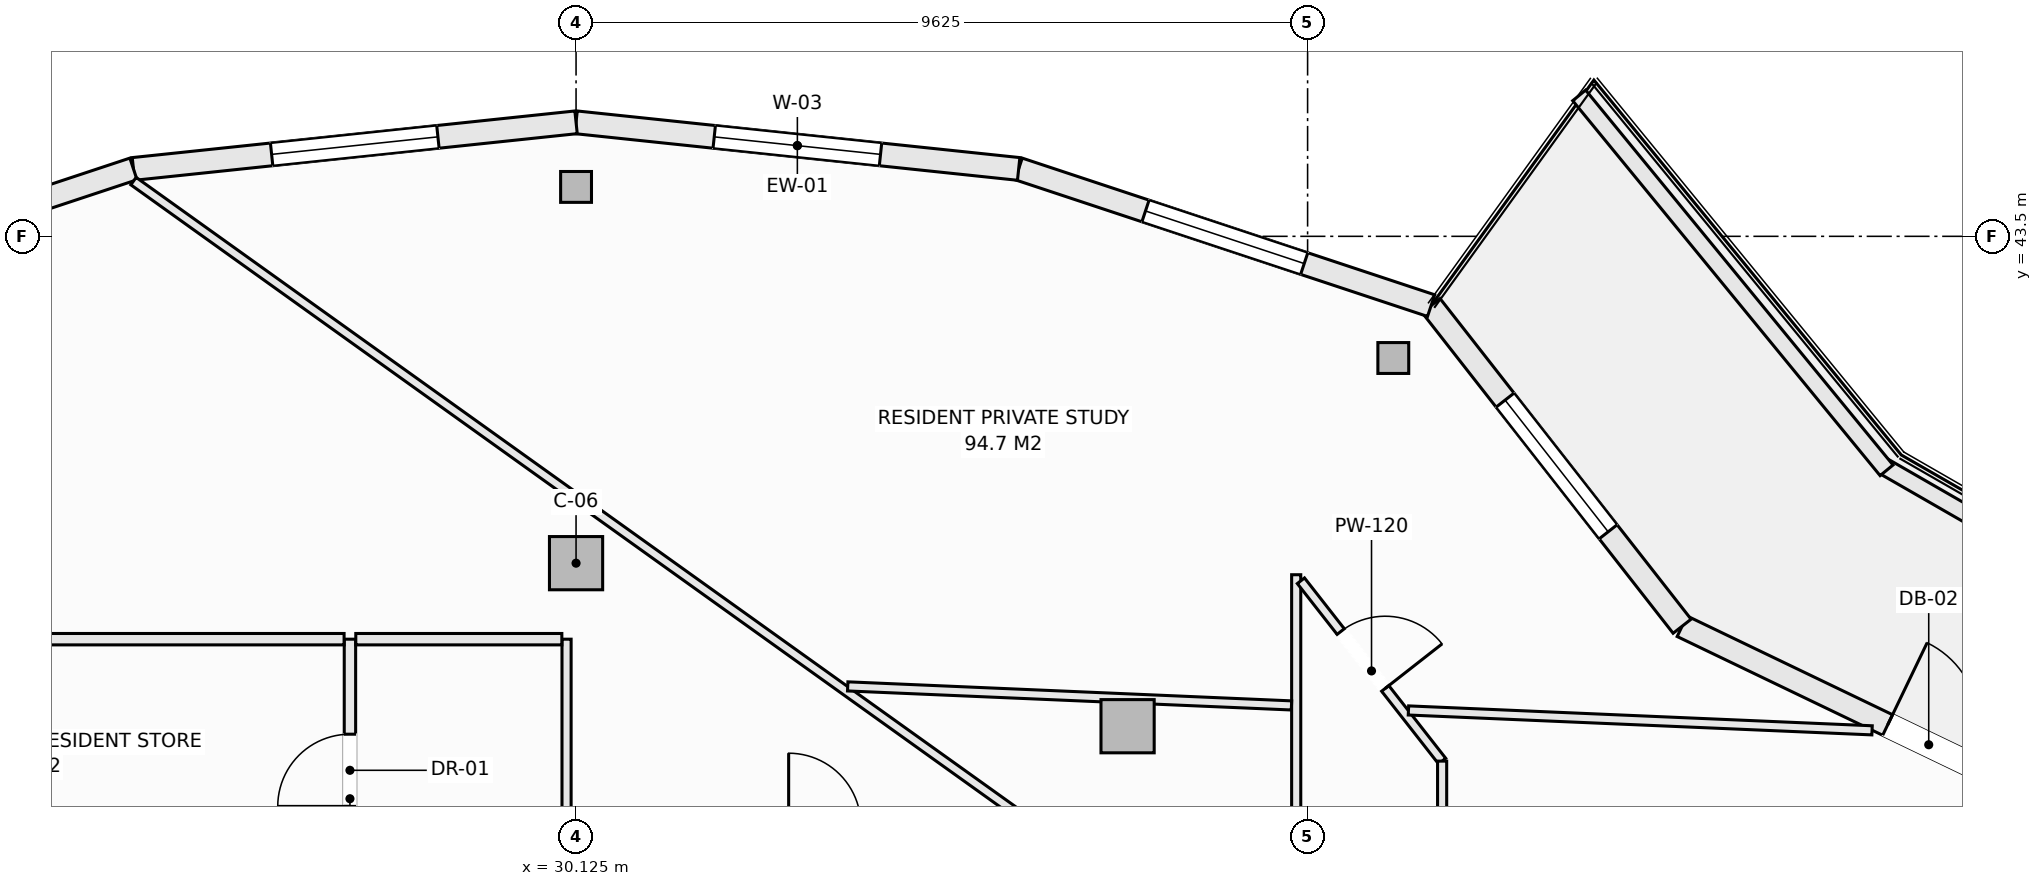
"""IFC4 building model, lengths in metres.
Left out: names, types, materials, properties, quantities, classifications, styles, units other than length and angle.
Written with IfcOpenShell. Run it as: python <this file> out.ifc"""

import sys

from ifc_helpers import new_model, si_unit, direction, frame, frame_2d, origin, origin_2d, place, context, subcontext, project, spatial, rectangle, hollow_rectangle, extrude, element, fill, save


model = new_model("IFC4")
c1 = context("Model", 3, precision=1e-05, world=origin(), true_north=direction((0.0, 1.0)))
c2 = subcontext(c1, "Body", "Model", "MODEL_VIEW")
j1 = project(units=[si_unit("LENGTHUNIT", "METRE"), si_unit("PLANEANGLEUNIT", "RADIAN")], contexts=[c1])
p1 = place(None, origin())
s1 = spatial("IfcSite", under=j1, at=p1, CompositionType="ELEMENT")
p2 = place(p1, origin())
s2 = spatial("IfcBuilding", under=s1, at=p2, CompositionType="ELEMENT")
p3 = place(p2, frame((0.0, 0.0, 252.5)))
s3 = spatial("IfcBuildingStorey", under=s2, at=p3, CompositionType="ELEMENT", Elevation=252.5)
for number, where, z_axis, x_axis in (
    (1, (40.878, 41.899, -0.27), (0.0, 0.0, 1.0), (1.0, 0.0, 0.0)),
    (2, (30.125, 44.15, -0.27), (0.0, 0.0, 1.0), (1.0, 0.0, 0.0)),
):
    element("IfcColumn", number, at=place(p3, frame(where, z_axis=z_axis, x_axis=x_axis)), inside=s3, PredefinedType="COLUMN", context=c2, shape_type="SweptSolid", body=[
        extrude(hollow_rectangle(XDim=0.406, YDim=0.406, WallThickness=0.016, at=origin_2d()), origin(), (0.0, 0.0, 1.0), 3.3),
    ])
for number, where, z_axis, x_axis in (
    (3, (37.382, 37.055, -0.27), (0.0, 0.0, 1.0), (1.0, 0.0, 0.0)),
    (4, (30.125, 39.2, -0.27), (0.0, 0.0, 1.0), (1.0, 0.0, 0.0)),
):
    element("IfcColumn", number, at=place(p3, frame(where, z_axis=z_axis, x_axis=x_axis)), inside=s3, PredefinedType="COLUMN", context=c2, shape_type="SweptSolid", body=[
        extrude(rectangle(XDim=0.7, YDim=0.7, at=origin_2d()), origin(), (0.0, 0.0, 1.0), 3.3),
    ])
p4 = place(p3, frame((44.677, 38.37, 0.0), z_axis=(0.0, 0.0, 1.0), x_axis=(0.901355238351, -0.433080517106, 0.0)))
e5 = element("IfcWall", 5, at=p4, inside=s3, PredefinedType="SOLIDWALL", context=c2, shape_type="SweptSolid", body=[
    extrude(rectangle(XDim=5.473, YDim=0.3, at=frame_2d((2.737, 0.0))), origin(), (0.0, 0.0, 1.0), 2.605),
])
p5 = place(p4, frame((3.0, 0.0, 0.0)))
e6 = element("IfcOpeningElement", 6, at=p5, cuts=e5, PredefinedType="OPENING", context=c2, shape_type="SweptSolid", body=[
    extrude(rectangle(XDim=1.2, YDim=2.2, at=frame_2d((0.6, 1.1))), frame((0.0, 0.16, 0.0), z_axis=(0.0, -1.0, 0.0), x_axis=(1.0, 0.0, 0.0)), (0.0, 0.0, 1.0), 0.32),
])
p6 = place(p3, frame((41.375, 42.588, 0.0), z_axis=(0.0, 0.0, 1.0), x_axis=(0.61644588519, -0.787397276241, 0.0)))
e7 = element("IfcWall", 7, at=p6, inside=s3, PredefinedType="SOLIDWALL", context=c2, shape_type="SweptSolid", body=[
    extrude(rectangle(XDim=5.357, YDim=0.3, at=frame_2d((2.678, 0.0))), origin(), (0.0, 0.0, 1.0), 2.605),
])
p7 = place(p6, frame((1.579, 0.0, 0.72)))
e8 = element("IfcOpeningElement", 8, at=p7, cuts=e7, PredefinedType="OPENING", context=c2, shape_type="SweptSolid", body=[
    extrude(rectangle(XDim=2.2, YDim=1.65, at=frame_2d((1.1, 0.825))), frame((0.0, 0.16, 0.0), z_axis=(0.0, -1.0, 0.0), x_axis=(1.0, 0.0, 0.0)), (0.0, 0.0, 1.0), 0.32),
])
p8 = place(p3, frame((35.948, 44.387, 0.0), z_axis=(0.0, 0.0, 1.0), x_axis=(0.949232769585, -0.314574552605, 0.0)))
e9 = element("IfcWall", 9, at=p8, inside=s3, PredefinedType="SOLIDWALL", context=c2, shape_type="SweptSolid", body=[
    extrude(rectangle(XDim=5.717, YDim=0.3, at=frame_2d((2.858, 0.0))), origin(), (0.0, 0.0, 1.0), 2.605),
])
p9 = place(p8, frame((1.758, 0.0, 0.72)))
e10 = element("IfcOpeningElement", 10, at=p9, cuts=e9, PredefinedType="OPENING", context=c2, shape_type="SweptSolid", body=[
    extrude(rectangle(XDim=2.2, YDim=1.65, at=frame_2d((1.1, 0.825))), frame((0.0, 0.16, 0.0), z_axis=(0.0, -1.0, 0.0), x_axis=(1.0, 0.0, 0.0)), (0.0, 0.0, 1.0), 0.32),
])
p10 = place(p3, frame((30.125, 45.0, 0.0), z_axis=(0.0, 0.0, 1.0), x_axis=(0.994500425783, -0.10473253132, 0.0)))
e11 = element("IfcWall", 11, at=p10, inside=s3, PredefinedType="SOLIDWALL", context=c2, shape_type="SweptSolid", body=[
    extrude(rectangle(XDim=5.856, YDim=0.3, at=frame_2d((2.928, 0.0))), origin(), (0.0, 0.0, 1.0), 2.605),
])
p11 = place(p10, frame((1.828, 0.0, 0.72)))
e12 = element("IfcOpeningElement", 12, at=p11, cuts=e11, PredefinedType="OPENING", context=c2, shape_type="SweptSolid", body=[
    extrude(rectangle(XDim=2.2, YDim=1.65, at=frame_2d((1.1, 0.825))), frame((0.0, 0.16, 0.0), z_axis=(0.0, -1.0, 0.0), x_axis=(1.0, 0.0, 0.0)), (0.0, 0.0, 1.0), 0.32),
])
p12 = place(p3, frame((24.302, 44.387, 0.0), z_axis=(0.0, 0.0, 1.0), x_axis=(0.994500425783, 0.10473253132, 0.0)))
e13 = element("IfcWall", 13, at=p12, inside=s3, PredefinedType="SOLIDWALL", context=c2, shape_type="SweptSolid", body=[
    extrude(rectangle(XDim=5.856, YDim=0.3, at=frame_2d((2.928, 0.0))), origin(), (0.0, 0.0, 1.0), 2.605),
])
p13 = place(p12, frame((1.828, 0.0, 0.72)))
e14 = element("IfcOpeningElement", 14, at=p13, cuts=e13, PredefinedType="OPENING", context=c2, shape_type="SweptSolid", body=[
    extrude(rectangle(XDim=2.2, YDim=1.65, at=frame_2d((1.1, 0.825))), frame((0.0, 0.16, 0.0), z_axis=(0.0, -1.0, 0.0), x_axis=(1.0, 0.0, 0.0)), (0.0, 0.0, 1.0), 0.32),
])
p14 = place(p3, frame((18.875, 42.588, 0.0), z_axis=(0.0, 0.0, 1.0), x_axis=(0.949232769585, 0.314574552605, 0.0)))
e15 = element("IfcWall", 15, at=p14, inside=s3, PredefinedType="SOLIDWALL", context=c2, shape_type="SweptSolid", body=[
    extrude(rectangle(XDim=5.717, YDim=0.3, at=frame_2d((2.858, 0.0))), origin(), (0.0, 0.0, 1.0), 2.605),
])
p15 = place(p14, frame((1.758, 0.0, 0.72)))
e16 = element("IfcOpeningElement", 16, at=p15, cuts=e15, PredefinedType="OPENING", context=c2, shape_type="SweptSolid", body=[
    extrude(rectangle(XDim=2.2, YDim=1.65, at=frame_2d((1.1, 0.825))), frame((0.0, 0.16, 0.0), z_axis=(0.0, -1.0, 0.0), x_axis=(1.0, 0.0, 0.0)), (0.0, 0.0, 1.0), 0.32),
])
p16 = place(p3, frame((47.321, 40.479, 0.0), z_axis=(0.0, 0.0, 1.0), x_axis=(0.866901621005, -0.49847926687, 0.0)))
e17 = element("IfcWall", 17, at=p16, inside=s3, PredefinedType="PARAPET", context=c2, shape_type="SweptSolid", body=[
    extrude(rectangle(XDim=6.197, YDim=0.22, at=frame_2d((3.098, 0.0))), origin(), (0.0, 0.0, 1.0), 0.52),
])
p17 = place(p3, frame((43.323, 45.354, 0.0), z_axis=(0.0, 0.0, 1.0), x_axis=(0.63407318032, -0.77327304492, 0.0)))
e18 = element("IfcWall", 18, at=p17, inside=s3, PredefinedType="PARAPET", context=c2, shape_type="SweptSolid", body=[
    extrude(rectangle(XDim=6.379, YDim=0.22, at=frame_2d((3.189, 0.0))), origin(), (0.0, 0.0, 1.0), 0.52),
])
p18 = place(p3, frame((27.15, 34.002, 0.0), z_axis=(0.0, 0.0, 1.0), x_axis=(0.0, 1.0, 0.0)))
e19 = element("IfcWall", 19, at=p18, inside=s3, PredefinedType="PARTITIONING", context=c2, shape_type="SweptSolid", body=[
    extrude(rectangle(XDim=4.198, YDim=0.15, at=frame_2d((2.099, 0.0))), origin(), (0.0, 0.0, 1.0), 3.03),
])
p19 = place(p18, frame((1.998, 0.0, 0.0)))
e20 = element("IfcOpeningElement", 20, at=p19, cuts=e19, PredefinedType="OPENING", context=c2, shape_type="SweptSolid", body=[
    extrude(rectangle(XDim=0.95, YDim=2.1, at=frame_2d((0.475, 1.05))), frame((0.0, 0.085, 0.0), z_axis=(0.0, -1.0, 0.0), x_axis=(1.0, 0.0, 0.0)), (0.0, 0.0, 1.0), 0.17),
])
p20 = place(p3, frame((30.0, 35.75, 0.0), z_axis=(0.0, 0.0, 1.0), x_axis=(0.0, 1.0, 0.0)))
e21 = element("IfcWall", 21, at=p20, inside=s3, PredefinedType="PARTITIONING", context=c2, shape_type="SweptSolid", body=[
    extrude(rectangle(XDim=2.45, YDim=0.12, at=frame_2d((1.225, 0.0))), origin(), (0.0, 0.0, 1.0), 3.03),
])
p21 = place(p3, frame((18.577, 38.2, 0.0), z_axis=(0.0, 0.0, 1.0), x_axis=(1.0, 0.0, 0.0)))
e22 = element("IfcWall", 22, at=p21, inside=s3, PredefinedType="PARTITIONING", context=c2, shape_type="SweptSolid", body=[
    extrude(rectangle(XDim=8.496, YDim=0.15, at=frame_2d((4.248, 0.0))), origin(), (0.0, 0.0, 1.0), 3.03),
])
p22 = place(p3, frame((27.227, 38.2, 0.0), z_axis=(0.0, 0.0, 1.0), x_axis=(1.0, 0.0, 0.0)))
e23 = element("IfcWall", 23, at=p22, inside=s3, PredefinedType="PARTITIONING", context=c2, shape_type="SweptSolid", body=[
    extrude(rectangle(XDim=2.711, YDim=0.15, at=frame_2d((1.355, 0.0))), origin(), (0.0, 0.0, 1.0), 3.03),
])
p23 = place(p3, frame((39.6, 31.182, 0.0), z_axis=(0.0, 0.0, 1.0), x_axis=(0.0, 1.0, 0.0)))
e24 = element("IfcWall", 24, at=p23, inside=s3, PredefinedType="PARTITIONING", context=c2, shape_type="SweptSolid", body=[
    extrude(rectangle(XDim=7.866, YDim=0.12, at=frame_2d((3.933, 0.0))), origin(), (0.0, 0.0, 1.0), 3.03),
])
p24 = place(p3, frame((39.662, 38.969, 0.0), z_axis=(0.0, 0.0, 1.0), x_axis=(0.616500468458, -0.787354540465, 0.0)))
e25 = element("IfcWall", 25, at=p24, inside=s3, PredefinedType="PARTITIONING", context=c2, shape_type="SweptSolid", body=[
    extrude(rectangle(XDim=3.014, YDim=0.12, at=frame_2d((1.507, 0.0))), origin(), (0.0, 0.0, 1.0), 3.03),
])
p25 = place(p24, frame((0.849, 0.0, 0.0)))
e26 = element("IfcOpeningElement", 26, at=p25, cuts=e25, PredefinedType="OPENING", context=c2, shape_type="SweptSolid", body=[
    extrude(rectangle(XDim=0.95, YDim=2.1, at=frame_2d((0.475, 1.05))), frame((0.0, 0.07, 0.0), z_axis=(0.0, -1.0, 0.0), x_axis=(1.0, 0.0, 0.0)), (0.0, 0.0, 1.0), 0.14),
])
p26 = place(p3, frame((41.52, 33.193, 0.0), z_axis=(0.0, 0.0, 1.0), x_axis=(0.0, 1.0, 0.0)))
e27 = element("IfcWall", 27, at=p26, inside=s3, PredefinedType="PARTITIONING", context=c2, shape_type="SweptSolid", body=[
    extrude(rectangle(XDim=3.403, YDim=0.12, at=frame_2d((1.701, 0.0))), origin(), (0.0, 0.0, 1.0), 3.03),
])
p27 = place(p26, frame((1.227, 0.0, 0.0)))
e28 = element("IfcOpeningElement", 28, at=p27, cuts=e27, PredefinedType="OPENING", context=c2, shape_type="SweptSolid", body=[
    extrude(rectangle(XDim=0.95, YDim=2.1, at=frame_2d((0.475, 1.05))), frame((0.0, 0.07, 0.0), z_axis=(0.0, -1.0, 0.0), x_axis=(1.0, 0.0, 0.0)), (0.0, 0.0, 1.0), 0.14),
])
p28 = place(p3, frame((24.302, 44.227, 0.0), z_axis=(0.0, 0.0, 1.0), x_axis=(0.813249507018, -0.581915147883, 0.0)))
e29 = element("IfcWall", 29, at=p28, inside=s3, PredefinedType="PARTITIONING", context=c2, shape_type="SweptSolid", body=[
    extrude(rectangle(XDim=14.46, YDim=0.12, at=frame_2d((7.23, 0.0))), origin(), (0.0, 0.0, 1.0), 2.478),
])
p29 = place(p3, frame((33.699, 37.579, 0.0), z_axis=(0.0, 0.0, 1.0), x_axis=(0.999081056781, -0.042860727724, 0.0)))
e30 = element("IfcWall", 30, at=p29, inside=s3, PredefinedType="PARTITIONING", context=c2, shape_type="SweptSolid", body=[
    extrude(rectangle(XDim=5.844, YDim=0.12, at=frame_2d((2.922, 0.0))), origin(), (0.0, 0.0, 1.0), 2.478),
])
p30 = place(p3, frame((41.077, 37.262, 0.0), z_axis=(0.0, 0.0, 1.0), x_axis=(0.999080744008, -0.042868017834, 0.0)))
e31 = element("IfcWall", 31, at=p30, inside=s3, PredefinedType="PARTITIONING", context=c2, shape_type="SweptSolid", body=[
    extrude(rectangle(XDim=6.105, YDim=0.12, at=frame_2d((3.053, 0.0))), origin(), (0.0, 0.0, 1.0), 2.605),
])
p31 = place(p5, origin())
e32 = element("IfcDoor", 32, at=p31, inside=s3, OperationType="SINGLE_SWING_LEFT", PredefinedType="DOOR", context=c2, shape_type="SweptSolid", body=[
    extrude(rectangle(XDim=1.2, YDim=2.2, at=frame_2d((0.6, 1.1))), frame((0.0, 0.025, 0.0), z_axis=(0.0, -1.0, 0.0), x_axis=(1.0, 0.0, 0.0)), (0.0, 0.0, 1.0), 0.05),
])
fill(e6, e32)
p32 = place(p7, origin())
e33 = element("IfcWindow", 33, at=p32, inside=s3, PartitioningType="SINGLE_PANEL", PredefinedType="WINDOW", context=c2, shape_type="SweptSolid", body=[
    extrude(rectangle(XDim=2.2, YDim=1.65, at=frame_2d((1.1, 0.825))), frame((0.0, 0.03, 0.0), z_axis=(0.0, -1.0, 0.0), x_axis=(1.0, 0.0, 0.0)), (0.0, 0.0, 1.0), 0.06),
])
fill(e8, e33)
p33 = place(p9, origin())
e34 = element("IfcWindow", 34, at=p33, inside=s3, PartitioningType="SINGLE_PANEL", PredefinedType="WINDOW", context=c2, shape_type="SweptSolid", body=[
    extrude(rectangle(XDim=2.2, YDim=1.65, at=frame_2d((1.1, 0.825))), frame((0.0, 0.03, 0.0), z_axis=(0.0, -1.0, 0.0), x_axis=(1.0, 0.0, 0.0)), (0.0, 0.0, 1.0), 0.06),
])
fill(e10, e34)
p34 = place(p11, origin())
e35 = element("IfcWindow", 35, at=p34, inside=s3, PartitioningType="SINGLE_PANEL", PredefinedType="WINDOW", context=c2, shape_type="SweptSolid", body=[
    extrude(rectangle(XDim=2.2, YDim=1.65, at=frame_2d((1.1, 0.825))), frame((0.0, 0.03, 0.0), z_axis=(0.0, -1.0, 0.0), x_axis=(1.0, 0.0, 0.0)), (0.0, 0.0, 1.0), 0.06),
])
fill(e12, e35)
p35 = place(p13, origin())
e36 = element("IfcWindow", 36, at=p35, inside=s3, PartitioningType="SINGLE_PANEL", PredefinedType="WINDOW", context=c2, shape_type="SweptSolid", body=[
    extrude(rectangle(XDim=2.2, YDim=1.65, at=frame_2d((1.1, 0.825))), frame((0.0, 0.03, 0.0), z_axis=(0.0, -1.0, 0.0), x_axis=(1.0, 0.0, 0.0)), (0.0, 0.0, 1.0), 0.06),
])
fill(e14, e36)
p36 = place(p19, origin())
e37 = element("IfcDoor", 37, at=p36, inside=s3, OperationType="SINGLE_SWING_LEFT", PredefinedType="DOOR", context=c2, shape_type="SweptSolid", body=[
    extrude(rectangle(XDim=0.95, YDim=2.1, at=frame_2d((0.475, 1.05))), frame((0.0, 0.025, 0.0), z_axis=(0.0, -1.0, 0.0), x_axis=(1.0, 0.0, 0.0)), (0.0, 0.0, 1.0), 0.05),
])
fill(e20, e37)
p37 = place(p25, origin())
e38 = element("IfcDoor", 38, at=p37, inside=s3, OperationType="SINGLE_SWING_RIGHT", PredefinedType="DOOR", context=c2, shape_type="SweptSolid", body=[
    extrude(rectangle(XDim=0.95, YDim=2.1, at=frame_2d((0.475, 1.05))), frame((0.0, 0.025, 0.0), z_axis=(0.0, -1.0, 0.0), x_axis=(1.0, 0.0, 0.0)), (0.0, 0.0, 1.0), 0.05),
])
fill(e26, e38)
save(model, sys.argv[1])
